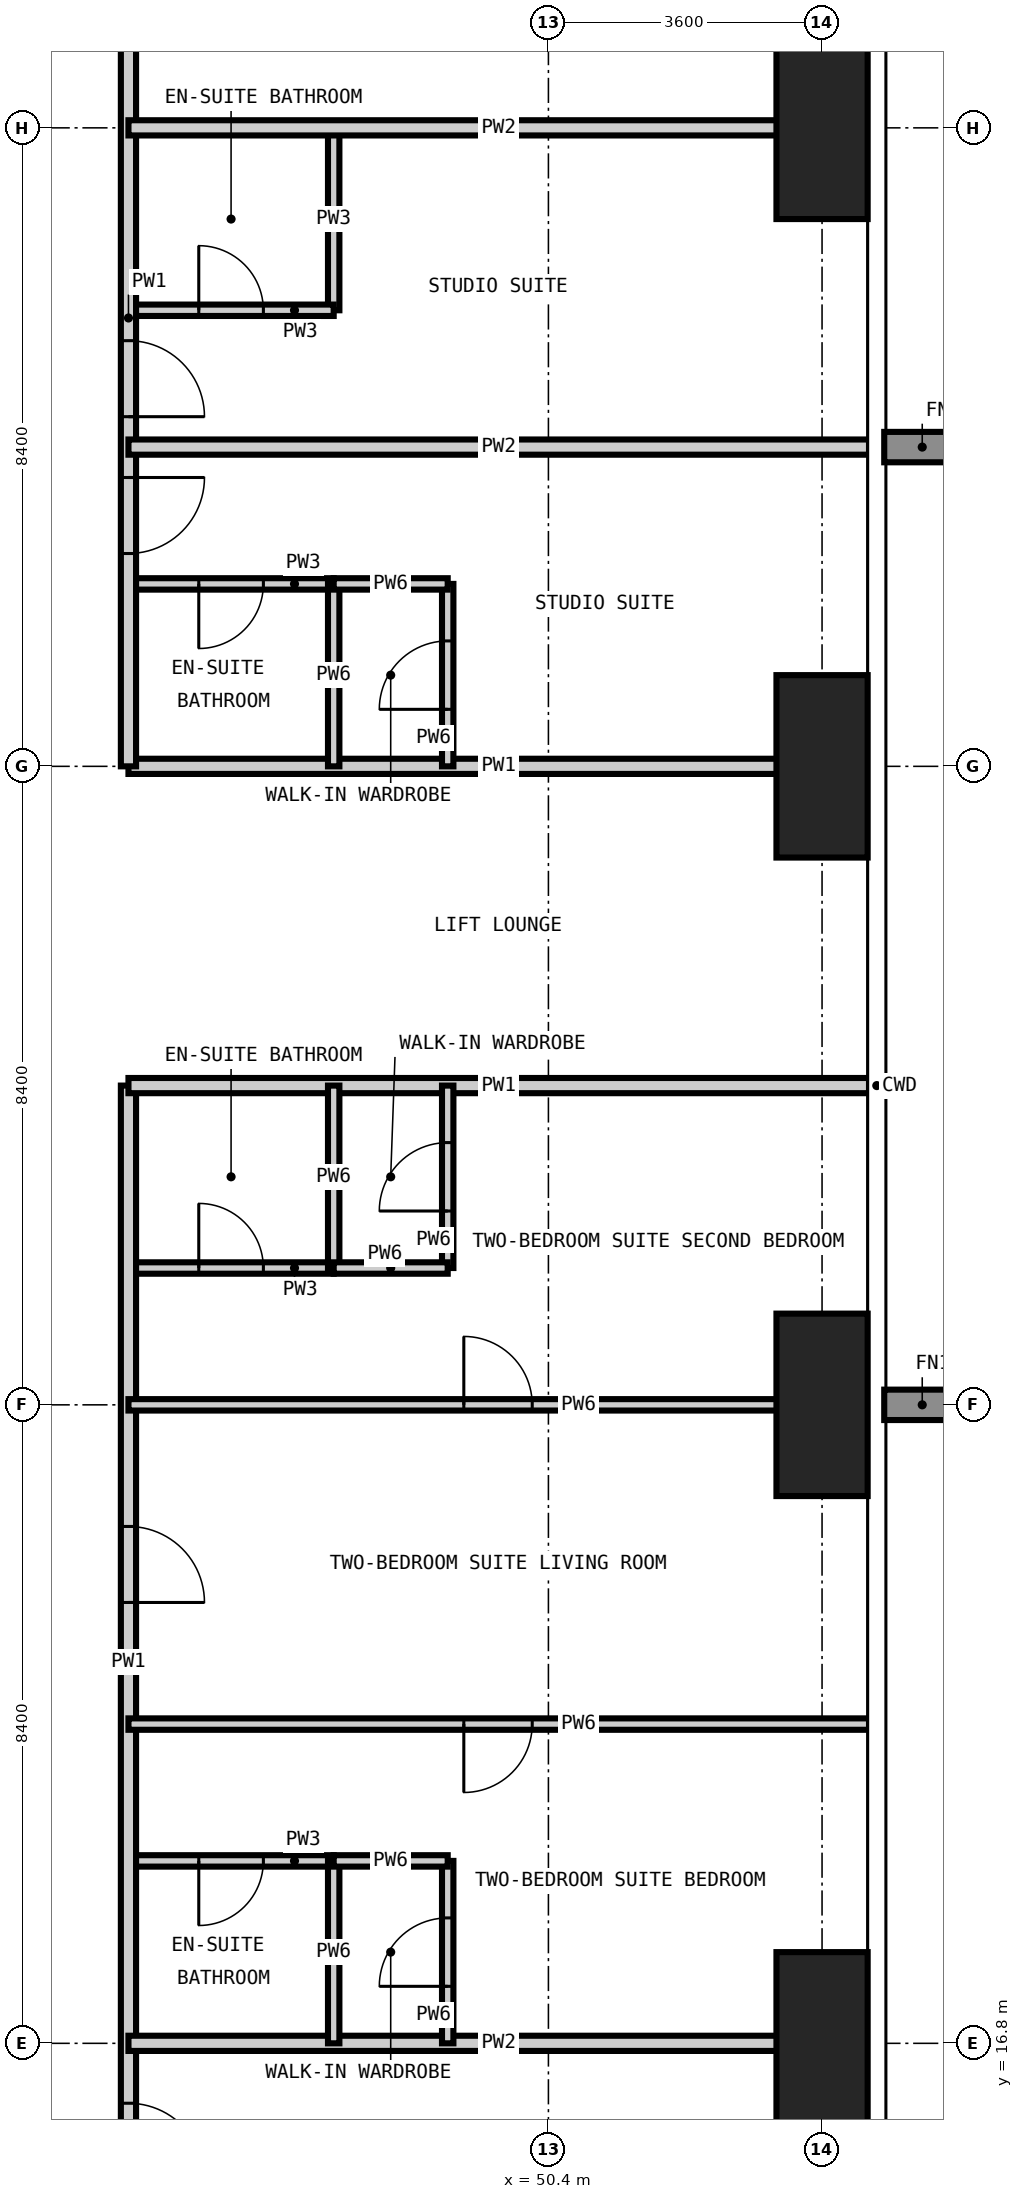
"""IFC4 building model, lengths in metres.
Left out: names, types, materials, properties, quantities, classifications, styles, units other than length and angle.
Written with IfcOpenShell. Run it as: python <this file> out.ifc"""

import sys

from ifc_helpers import new_model, si_unit, direction, frame, frame_2d, origin, origin_2d, place, context, subcontext, project, spatial, rectangle, extrude, element, fill, save


model = new_model("IFC4")
c1 = context("Model", 3, precision=1e-05, world=origin(), true_north=direction((0.0, 1.0)))
c2 = subcontext(c1, "Body", "Model", "MODEL_VIEW")
j1 = project(units=[si_unit("LENGTHUNIT", "METRE"), si_unit("PLANEANGLEUNIT", "RADIAN")], contexts=[c1])
p1 = place(None, origin())
s1 = spatial("IfcSite", under=j1, at=p1, CompositionType="ELEMENT")
p2 = place(p1, origin())
s2 = spatial("IfcBuilding", under=s1, at=p2, CompositionType="ELEMENT")
p3 = place(p2, frame((0.0, 0.0, 233.4)))
s3 = spatial("IfcBuildingStorey", under=s2, at=p3, CompositionType="ELEMENT", Elevation=233.4)
for number, where, z_axis, x_axis in (
    (1, (54.0, 16.8, -0.35), (0.0, 0.0, 1.0), (1.0, 0.0, 0.0)),
    (2, (54.0, 25.2, -0.35), (0.0, 0.0, 1.0), (1.0, 0.0, 0.0)),
    (3, (54.0, 33.6, -0.35), (0.0, 0.0, 1.0), (1.0, 0.0, 0.0)),
    (4, (54.0, 42.0, -0.35), (0.0, 0.0, 1.0), (1.0, 0.0, 0.0)),
):
    element("IfcColumn", number, at=place(p3, frame(where, z_axis=z_axis, x_axis=x_axis)), inside=s3, PredefinedType="COLUMN", context=c2, shape_type="SweptSolid", body=[
        extrude(rectangle(XDim=1.2, YDim=2.4, at=origin_2d()), origin(), (0.0, 0.0, 1.0), 3.9),
    ])
p4 = place(p3, frame((47.575, 39.6, 0.0), z_axis=(0.0, 0.0, 1.0), x_axis=(0.0, 1.0, 0.0)))
e5 = element("IfcWall", 5, at=p4, inside=s3, PredefinedType="PARTITIONING", context=c2, shape_type="SweptSolid", body=[
    extrude(rectangle(XDim=2.4, YDim=0.15, at=frame_2d((1.2, 0.0))), origin(), (0.0, 0.0, 1.0), 3.55),
])
p5 = place(p3, frame((44.875, 19.2, 0.0), z_axis=(0.0, 0.0, 1.0), x_axis=(1.0, 0.0, 0.0)))
e6 = element("IfcWall", 6, at=p5, inside=s3, PredefinedType="PARTITIONING", context=c2, shape_type="SweptSolid", body=[
    extrude(rectangle(XDim=2.7, YDim=0.15, at=frame_2d((1.35, 0.0))), origin(), (0.0, 0.0, 1.0), 3.55),
])
p6 = place(p5, frame((0.925, 0.0, 0.0)))
e7 = element("IfcOpeningElement", 7, at=p6, cuts=e6, PredefinedType="OPENING", context=c2, shape_type="SweptSolid", body=[
    extrude(rectangle(XDim=0.85, YDim=2.1, at=frame_2d((0.425, 1.05))), frame((0.0, 0.085, 0.0), z_axis=(0.0, -1.0, 0.0), x_axis=(1.0, 0.0, 0.0)), (0.0, 0.0, 1.0), 0.17),
])
p7 = place(p3, frame((44.875, 27.0, 0.0), z_axis=(0.0, 0.0, 1.0), x_axis=(1.0, 0.0, 0.0)))
e8 = element("IfcWall", 8, at=p7, inside=s3, PredefinedType="PARTITIONING", context=c2, shape_type="SweptSolid", body=[
    extrude(rectangle(XDim=2.7, YDim=0.15, at=frame_2d((1.35, 0.0))), origin(), (0.0, 0.0, 1.0), 3.55),
])
p8 = place(p7, frame((0.925, 0.0, 0.0)))
e9 = element("IfcOpeningElement", 9, at=p8, cuts=e8, PredefinedType="OPENING", context=c2, shape_type="SweptSolid", body=[
    extrude(rectangle(XDim=0.85, YDim=2.1, at=frame_2d((0.425, 1.05))), frame((0.0, 0.085, 0.0), z_axis=(0.0, -1.0, 0.0), x_axis=(1.0, 0.0, 0.0)), (0.0, 0.0, 1.0), 0.17),
])
p9 = place(p3, frame((44.875, 36.0, 0.0), z_axis=(0.0, 0.0, 1.0), x_axis=(1.0, 0.0, 0.0)))
e10 = element("IfcWall", 10, at=p9, inside=s3, PredefinedType="PARTITIONING", context=c2, shape_type="SweptSolid", body=[
    extrude(rectangle(XDim=2.7, YDim=0.15, at=frame_2d((1.35, 0.0))), origin(), (0.0, 0.0, 1.0), 3.55),
])
p10 = place(p9, frame((0.925, 0.0, 0.0)))
e11 = element("IfcOpeningElement", 11, at=p10, cuts=e10, PredefinedType="OPENING", context=c2, shape_type="SweptSolid", body=[
    extrude(rectangle(XDim=0.85, YDim=2.1, at=frame_2d((0.425, 1.05))), frame((0.0, 0.085, 0.0), z_axis=(0.0, -1.0, 0.0), x_axis=(1.0, 0.0, 0.0)), (0.0, 0.0, 1.0), 0.17),
])
p11 = place(p3, frame((44.875, 39.6, 0.0), z_axis=(0.0, 0.0, 1.0), x_axis=(1.0, 0.0, 0.0)))
e12 = element("IfcWall", 12, at=p11, inside=s3, PredefinedType="PARTITIONING", context=c2, shape_type="SweptSolid", body=[
    extrude(rectangle(XDim=2.7, YDim=0.15, at=frame_2d((1.35, 0.0))), origin(), (0.0, 0.0, 1.0), 3.55),
])
p12 = place(p11, frame((0.925, 0.0, 0.0)))
e13 = element("IfcOpeningElement", 13, at=p12, cuts=e12, PredefinedType="OPENING", context=c2, shape_type="SweptSolid", body=[
    extrude(rectangle(XDim=0.85, YDim=2.1, at=frame_2d((0.425, 1.05))), frame((0.0, 0.085, 0.0), z_axis=(0.0, -1.0, 0.0), x_axis=(1.0, 0.0, 0.0)), (0.0, 0.0, 1.0), 0.17),
])
p13 = place(p3, frame((44.875, 33.6, 0.0), z_axis=(0.0, 0.0, 1.0), x_axis=(1.0, 0.0, 0.0)))
e14 = element("IfcWall", 14, at=p13, inside=s3, PredefinedType="PARTITIONING", context=c2, shape_type="SweptSolid", body=[
    extrude(rectangle(XDim=9.743, YDim=0.2, at=frame_2d((4.872, 0.0))), origin(), (0.0, 0.0, 1.0), 3.55),
])
p14 = place(p3, frame((44.875, 29.4, 0.0), z_axis=(0.0, 0.0, 1.0), x_axis=(0.0, -1.0, 0.0)))
e15 = element("IfcWall", 15, at=p14, inside=s3, PredefinedType="PARTITIONING", context=c2, shape_type="SweptSolid", body=[
    extrude(rectangle(XDim=15.175, YDim=0.2, at=frame_2d((7.587, 0.0))), origin(), (0.0, 0.0, 1.0), 3.55),
])
p15 = place(p14, frame((5.8, 0.0, 0.0)))
e16 = element("IfcOpeningElement", 16, at=p15, cuts=e15, PredefinedType="OPENING", context=c2, shape_type="SweptSolid", body=[
    extrude(rectangle(XDim=1.0, YDim=2.2, at=frame_2d((0.5, 1.1))), frame((0.0, 0.11, 0.0), z_axis=(0.0, -1.0, 0.0), x_axis=(1.0, 0.0, 0.0)), (0.0, 0.0, 1.0), 0.22),
])
p16 = place(p14, frame((13.388, 0.0, 0.0)))
e17 = element("IfcOpeningElement", 17, at=p16, cuts=e15, PredefinedType="OPENING", context=c2, shape_type="SweptSolid", body=[
    extrude(rectangle(XDim=1.0, YDim=2.2, at=frame_2d((0.5, 1.1))), frame((0.0, 0.11, 0.0), z_axis=(0.0, -1.0, 0.0), x_axis=(1.0, 0.0, 0.0)), (0.0, 0.0, 1.0), 0.22),
])
p17 = place(p3, frame((44.875, 45.175, 0.0), z_axis=(0.0, 0.0, 1.0), x_axis=(0.0, -1.0, 0.0)))
e18 = element("IfcWall", 18, at=p17, inside=s3, PredefinedType="PARTITIONING", context=c2, shape_type="SweptSolid", body=[
    extrude(rectangle(XDim=11.575, YDim=0.2, at=frame_2d((5.788, 0.0))), origin(), (0.0, 0.0, 1.0), 3.55),
])
p18 = place(p17, frame((7.775, 0.0, 0.0)))
e19 = element("IfcOpeningElement", 19, at=p18, cuts=e18, PredefinedType="OPENING", context=c2, shape_type="SweptSolid", body=[
    extrude(rectangle(XDim=1.0, YDim=2.2, at=frame_2d((0.5, 1.1))), frame((0.0, 0.11, 0.0), z_axis=(0.0, -1.0, 0.0), x_axis=(1.0, 0.0, 0.0)), (0.0, 0.0, 1.0), 0.22),
])
p19 = place(p17, frame((5.975, 0.0, 0.0)))
e20 = element("IfcOpeningElement", 20, at=p19, cuts=e18, PredefinedType="OPENING", context=c2, shape_type="SweptSolid", body=[
    extrude(rectangle(XDim=1.0, YDim=2.2, at=frame_2d((0.5, 1.1))), frame((0.0, 0.11, 0.0), z_axis=(0.0, -1.0, 0.0), x_axis=(1.0, 0.0, 0.0)), (0.0, 0.0, 1.0), 0.22),
])
p20 = place(p17, frame((1.088, 0.0, 0.0)))
e21 = element("IfcOpeningElement", 21, at=p20, cuts=e18, PredefinedType="OPENING", context=c2, shape_type="SweptSolid", body=[
    extrude(rectangle(XDim=1.0, YDim=2.2, at=frame_2d((0.5, 1.1))), frame((0.0, 0.11, 0.0), z_axis=(0.0, -1.0, 0.0), x_axis=(1.0, 0.0, 0.0)), (0.0, 0.0, 1.0), 0.22),
])
for number, where, z_axis, x_axis in (
    (22, (54.618, 29.4, 0.0), (0.0, 0.0, 1.0), (-1.0, 0.0, 0.0)),
    (23, (44.875, 16.8, 0.0), (0.0, 0.0, 1.0), (1.0, 0.0, 0.0)),
    (24, (44.875, 37.8, 0.0), (0.0, 0.0, 1.0), (1.0, 0.0, 0.0)),
    (25, (44.875, 42.0, 0.0), (0.0, 0.0, 1.0), (1.0, 0.0, 0.0)),
):
    element("IfcWall", number, at=place(p3, frame(where, z_axis=z_axis, x_axis=x_axis)), inside=s3, PredefinedType="PARTITIONING", context=c2, shape_type="SweptSolid", body=[
        extrude(rectangle(XDim=9.743, YDim=0.2, at=frame_2d((4.872, 0.0))), origin(), (0.0, 0.0, 1.0), 3.55),
    ])
for number, where, z_axis, x_axis in (
    (26, (47.575, 16.8, 0.0), (0.0, 0.0, 1.0), (0.0, 1.0, 0.0)),
    (27, (47.575, 27.0, 0.0), (0.0, 0.0, 1.0), (0.0, 1.0, 0.0)),
    (28, (47.575, 33.6, 0.0), (0.0, 0.0, 1.0), (0.0, 1.0, 0.0)),
):
    element("IfcWall", number, at=place(p3, frame(where, z_axis=z_axis, x_axis=x_axis)), inside=s3, PredefinedType="PARTITIONING", context=c2, shape_type="SweptSolid", body=[
        extrude(rectangle(XDim=2.4, YDim=0.15, at=frame_2d((1.2, 0.0))), origin(), (0.0, 0.0, 1.0), 3.55),
    ])
p21 = place(p3, frame((49.075, 16.8, 0.0), z_axis=(0.0, 0.0, 1.0), x_axis=(0.0, 1.0, 0.0)))
e29 = element("IfcWall", 29, at=p21, inside=s3, PredefinedType="PARTITIONING", context=c2, shape_type="SweptSolid", body=[
    extrude(rectangle(XDim=2.4, YDim=0.15, at=frame_2d((1.2, 0.0))), origin(), (0.0, 0.0, 1.0), 3.55),
])
p22 = place(p21, frame((0.75, 0.0, 0.0)))
e30 = element("IfcOpeningElement", 30, at=p22, cuts=e29, PredefinedType="OPENING", context=c2, shape_type="SweptSolid", body=[
    extrude(rectangle(XDim=0.9, YDim=2.1, at=frame_2d((0.45, 1.05))), frame((0.0, 0.085, 0.0), z_axis=(0.0, -1.0, 0.0), x_axis=(1.0, 0.0, 0.0)), (0.0, 0.0, 1.0), 0.17),
])
p23 = place(p3, frame((49.075, 27.0, 0.0), z_axis=(0.0, 0.0, 1.0), x_axis=(0.0, 1.0, 0.0)))
e31 = element("IfcWall", 31, at=p23, inside=s3, PredefinedType="PARTITIONING", context=c2, shape_type="SweptSolid", body=[
    extrude(rectangle(XDim=2.4, YDim=0.15, at=frame_2d((1.2, 0.0))), origin(), (0.0, 0.0, 1.0), 3.55),
])
p24 = place(p23, frame((0.75, 0.0, 0.0)))
e32 = element("IfcOpeningElement", 32, at=p24, cuts=e31, PredefinedType="OPENING", context=c2, shape_type="SweptSolid", body=[
    extrude(rectangle(XDim=0.9, YDim=2.1, at=frame_2d((0.45, 1.05))), frame((0.0, 0.085, 0.0), z_axis=(0.0, -1.0, 0.0), x_axis=(1.0, 0.0, 0.0)), (0.0, 0.0, 1.0), 0.17),
])
p25 = place(p3, frame((49.075, 33.6, 0.0), z_axis=(0.0, 0.0, 1.0), x_axis=(0.0, 1.0, 0.0)))
e33 = element("IfcWall", 33, at=p25, inside=s3, PredefinedType="PARTITIONING", context=c2, shape_type="SweptSolid", body=[
    extrude(rectangle(XDim=2.4, YDim=0.15, at=frame_2d((1.2, 0.0))), origin(), (0.0, 0.0, 1.0), 3.55),
])
p26 = place(p25, frame((0.75, 0.0, 0.0)))
e34 = element("IfcOpeningElement", 34, at=p26, cuts=e33, PredefinedType="OPENING", context=c2, shape_type="SweptSolid", body=[
    extrude(rectangle(XDim=0.9, YDim=2.1, at=frame_2d((0.45, 1.05))), frame((0.0, 0.085, 0.0), z_axis=(0.0, -1.0, 0.0), x_axis=(1.0, 0.0, 0.0)), (0.0, 0.0, 1.0), 0.17),
])
p27 = place(p3, frame((47.575, 19.2, 0.0), z_axis=(0.0, 0.0, 1.0), x_axis=(1.0, 0.0, 0.0)))
e35 = element("IfcWall", 35, at=p27, inside=s3, PredefinedType="PARTITIONING", context=c2, shape_type="SweptSolid", body=[
    extrude(rectangle(XDim=1.5, YDim=0.15, at=frame_2d((0.75, 0.0))), origin(), (0.0, 0.0, 1.0), 3.55),
])
p28 = place(p3, frame((44.875, 21.0, 0.0), z_axis=(0.0, 0.0, 1.0), x_axis=(1.0, 0.0, 0.0)))
e36 = element("IfcWall", 36, at=p28, inside=s3, PredefinedType="PARTITIONING", context=c2, shape_type="SweptSolid", body=[
    extrude(rectangle(XDim=9.743, YDim=0.15, at=frame_2d((4.872, 0.0))), origin(), (0.0, 0.0, 1.0), 3.55),
])
p29 = place(p28, frame((4.412, 0.0, 0.0)))
e37 = element("IfcOpeningElement", 37, at=p29, cuts=e36, PredefinedType="OPENING", context=c2, shape_type="SweptSolid", body=[
    extrude(rectangle(XDim=0.9, YDim=2.1, at=frame_2d((0.45, 1.05))), frame((0.0, 0.085, 0.0), z_axis=(0.0, -1.0, 0.0), x_axis=(1.0, 0.0, 0.0)), (0.0, 0.0, 1.0), 0.17),
])
p30 = place(p3, frame((44.875, 25.2, 0.0), z_axis=(0.0, 0.0, 1.0), x_axis=(1.0, 0.0, 0.0)))
e38 = element("IfcWall", 38, at=p30, inside=s3, PredefinedType="PARTITIONING", context=c2, shape_type="SweptSolid", body=[
    extrude(rectangle(XDim=9.743, YDim=0.15, at=frame_2d((4.872, 0.0))), origin(), (0.0, 0.0, 1.0), 3.55),
])
p31 = place(p30, frame((4.412, 0.0, 0.0)))
e39 = element("IfcOpeningElement", 39, at=p31, cuts=e38, PredefinedType="OPENING", context=c2, shape_type="SweptSolid", body=[
    extrude(rectangle(XDim=0.9, YDim=2.1, at=frame_2d((0.45, 1.05))), frame((0.0, 0.085, 0.0), z_axis=(0.0, -1.0, 0.0), x_axis=(1.0, 0.0, 0.0)), (0.0, 0.0, 1.0), 0.17),
])
for number, where, z_axis, x_axis in (
    (40, (47.575, 27.0, 0.0), (0.0, 0.0, 1.0), (1.0, 0.0, 0.0)),
    (41, (47.575, 36.0, 0.0), (0.0, 0.0, 1.0), (1.0, 0.0, 0.0)),
):
    element("IfcWall", number, at=place(p3, frame(where, z_axis=z_axis, x_axis=x_axis)), inside=s3, PredefinedType="PARTITIONING", context=c2, shape_type="SweptSolid", body=[
        extrude(rectangle(XDim=1.5, YDim=0.15, at=frame_2d((0.75, 0.0))), origin(), (0.0, 0.0, 1.0), 3.55),
    ])
p32 = place(p15, origin())
e42 = element("IfcDoor", 42, at=p32, inside=s3, OperationType="SINGLE_SWING_RIGHT", PredefinedType="DOOR", context=c2, shape_type="SweptSolid", body=[
    extrude(rectangle(XDim=1.0, YDim=2.2, at=frame_2d((0.5, 1.1))), frame((0.0, 0.025, 0.0), z_axis=(0.0, -1.0, 0.0), x_axis=(1.0, 0.0, 0.0)), (0.0, 0.0, 1.0), 0.05),
])
fill(e16, e42)
p33 = place(p29, frame((0.9, 0.0, 0.0), z_axis=(0.0, 0.0, 1.0), x_axis=(-1.0, 0.0, 0.0)))
e43 = element("IfcDoor", 43, at=p33, inside=s3, OperationType="SINGLE_SWING_RIGHT", PredefinedType="DOOR", context=c2, shape_type="SweptSolid", body=[
    extrude(rectangle(XDim=0.9, YDim=2.1, at=frame_2d((0.45, 1.05))), frame((0.0, 0.025, 0.0), z_axis=(0.0, -1.0, 0.0), x_axis=(1.0, 0.0, 0.0)), (0.0, 0.0, 1.0), 0.05),
])
fill(e37, e43)
p34 = place(p6, frame((0.85, 0.0, 0.0), z_axis=(0.0, 0.0, 1.0), x_axis=(-1.0, 0.0, 0.0)))
e44 = element("IfcDoor", 44, at=p34, inside=s3, OperationType="SINGLE_SWING_RIGHT", PredefinedType="DOOR", context=c2, shape_type="SweptSolid", body=[
    extrude(rectangle(XDim=0.85, YDim=2.1, at=frame_2d((0.425, 1.05))), frame((0.0, 0.025, 0.0), z_axis=(0.0, -1.0, 0.0), x_axis=(1.0, 0.0, 0.0)), (0.0, 0.0, 1.0), 0.05),
])
fill(e7, e44)
p35 = place(p22, origin())
e45 = element("IfcDoor", 45, at=p35, inside=s3, OperationType="SINGLE_SWING_LEFT", PredefinedType="DOOR", context=c2, shape_type="SweptSolid", body=[
    extrude(rectangle(XDim=0.9, YDim=2.1, at=frame_2d((0.45, 1.05))), frame((0.0, 0.025, 0.0), z_axis=(0.0, -1.0, 0.0), x_axis=(1.0, 0.0, 0.0)), (0.0, 0.0, 1.0), 0.05),
])
fill(e30, e45)
p36 = place(p31, origin())
e46 = element("IfcDoor", 46, at=p36, inside=s3, OperationType="SINGLE_SWING_LEFT", PredefinedType="DOOR", context=c2, shape_type="SweptSolid", body=[
    extrude(rectangle(XDim=0.9, YDim=2.1, at=frame_2d((0.45, 1.05))), frame((0.0, 0.025, 0.0), z_axis=(0.0, -1.0, 0.0), x_axis=(1.0, 0.0, 0.0)), (0.0, 0.0, 1.0), 0.05),
])
fill(e39, e46)
p37 = place(p8, origin())
e47 = element("IfcDoor", 47, at=p37, inside=s3, OperationType="SINGLE_SWING_LEFT", PredefinedType="DOOR", context=c2, shape_type="SweptSolid", body=[
    extrude(rectangle(XDim=0.85, YDim=2.1, at=frame_2d((0.425, 1.05))), frame((0.0, 0.025, 0.0), z_axis=(0.0, -1.0, 0.0), x_axis=(1.0, 0.0, 0.0)), (0.0, 0.0, 1.0), 0.05),
])
fill(e9, e47)
p38 = place(p24, origin())
e48 = element("IfcDoor", 48, at=p38, inside=s3, OperationType="SINGLE_SWING_LEFT", PredefinedType="DOOR", context=c2, shape_type="SweptSolid", body=[
    extrude(rectangle(XDim=0.9, YDim=2.1, at=frame_2d((0.45, 1.05))), frame((0.0, 0.025, 0.0), z_axis=(0.0, -1.0, 0.0), x_axis=(1.0, 0.0, 0.0)), (0.0, 0.0, 1.0), 0.05),
])
fill(e32, e48)
p39 = place(p18, origin())
e49 = element("IfcDoor", 49, at=p39, inside=s3, OperationType="SINGLE_SWING_LEFT", PredefinedType="DOOR", context=c2, shape_type="SweptSolid", body=[
    extrude(rectangle(XDim=1.0, YDim=2.2, at=frame_2d((0.5, 1.1))), frame((0.0, 0.025, 0.0), z_axis=(0.0, -1.0, 0.0), x_axis=(1.0, 0.0, 0.0)), (0.0, 0.0, 1.0), 0.05),
])
fill(e19, e49)
p40 = place(p10, frame((0.85, 0.0, 0.0), z_axis=(0.0, 0.0, 1.0), x_axis=(-1.0, 0.0, 0.0)))
e50 = element("IfcDoor", 50, at=p40, inside=s3, OperationType="SINGLE_SWING_RIGHT", PredefinedType="DOOR", context=c2, shape_type="SweptSolid", body=[
    extrude(rectangle(XDim=0.85, YDim=2.1, at=frame_2d((0.425, 1.05))), frame((0.0, 0.025, 0.0), z_axis=(0.0, -1.0, 0.0), x_axis=(1.0, 0.0, 0.0)), (0.0, 0.0, 1.0), 0.05),
])
fill(e11, e50)
p41 = place(p26, origin())
e51 = element("IfcDoor", 51, at=p41, inside=s3, OperationType="SINGLE_SWING_LEFT", PredefinedType="DOOR", context=c2, shape_type="SweptSolid", body=[
    extrude(rectangle(XDim=0.9, YDim=2.1, at=frame_2d((0.45, 1.05))), frame((0.0, 0.025, 0.0), z_axis=(0.0, -1.0, 0.0), x_axis=(1.0, 0.0, 0.0)), (0.0, 0.0, 1.0), 0.05),
])
fill(e34, e51)
p42 = place(p19, origin())
e52 = element("IfcDoor", 52, at=p42, inside=s3, OperationType="SINGLE_SWING_RIGHT", PredefinedType="DOOR", context=c2, shape_type="SweptSolid", body=[
    extrude(rectangle(XDim=1.0, YDim=2.2, at=frame_2d((0.5, 1.1))), frame((0.0, 0.025, 0.0), z_axis=(0.0, -1.0, 0.0), x_axis=(1.0, 0.0, 0.0)), (0.0, 0.0, 1.0), 0.05),
])
fill(e20, e52)
p43 = place(p12, origin())
e53 = element("IfcDoor", 53, at=p43, inside=s3, OperationType="SINGLE_SWING_LEFT", PredefinedType="DOOR", context=c2, shape_type="SweptSolid", body=[
    extrude(rectangle(XDim=0.85, YDim=2.1, at=frame_2d((0.425, 1.05))), frame((0.0, 0.025, 0.0), z_axis=(0.0, -1.0, 0.0), x_axis=(1.0, 0.0, 0.0)), (0.0, 0.0, 1.0), 0.05),
])
fill(e13, e53)
p44 = place(p16, origin())
e54 = element("IfcDoor", 54, at=p44, inside=s3, OperationType="SINGLE_SWING_RIGHT", PredefinedType="DOOR", context=c2, shape_type="SweptSolid", body=[
    extrude(rectangle(XDim=1.0, YDim=2.2, at=frame_2d((0.5, 1.1))), frame((0.0, 0.025, 0.0), z_axis=(0.0, -1.0, 0.0), x_axis=(1.0, 0.0, 0.0)), (0.0, 0.0, 1.0), 0.05),
])
fill(e17, e54)
save(model, sys.argv[1])
